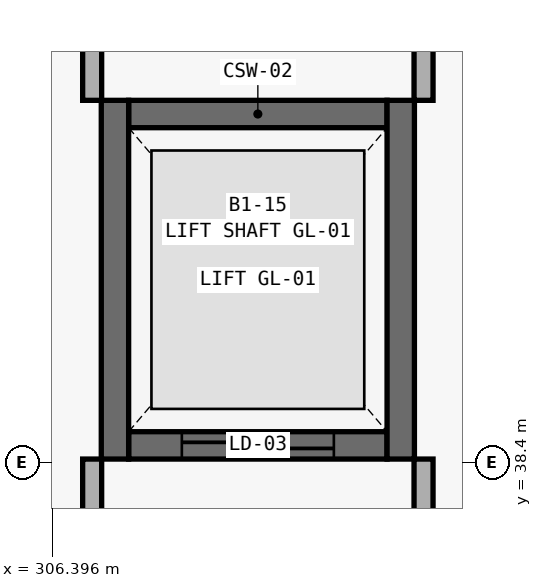
"""IFC4 building model, lengths in metres.
Left out: names, types, materials, properties, quantities, classifications, styles, units other than length and angle.
Written with IfcOpenShell. Run it as: python <this file> out.ifc"""

import sys

from ifc_helpers import new_model, si_unit, direction, frame, frame_2d, origin, place, context, subcontext, project, spatial, rectangle, extrude, element, fill, save


model = new_model("IFC4")
c1 = context("Model", 3, precision=1e-05, world=origin(), true_north=direction((0.0, 1.0)))
c2 = subcontext(c1, "Body", "Model", "MODEL_VIEW")
j1 = project(units=[si_unit("LENGTHUNIT", "METRE"), si_unit("PLANEANGLEUNIT", "RADIAN")], contexts=[c1])
p1 = place(None, origin())
s1 = spatial("IfcSite", under=j1, at=p1, CompositionType="ELEMENT")
p2 = place(p1, origin())
s2 = spatial("IfcBuilding", under=s1, at=p2, CompositionType="ELEMENT")
p3 = place(p2, frame((0.0, 0.0, -4.8)))
s3 = spatial("IfcBuildingStorey", under=s2, at=p3, CompositionType="ELEMENT", Elevation=-4.8)
p4 = place(p3, frame((307.4, 42.98, 0.0), z_axis=(0.0, 0.0, 1.0), x_axis=(1.0, 0.0, 0.0)))
e1 = element("IfcWall", 1, at=p4, inside=s3, PredefinedType="SHEAR", context=c2, shape_type="SweptSolid", body=[
    extrude(rectangle(XDim=3.4, YDim=0.36, at=frame_2d((1.7, 0.0))), origin(), (0.0, 0.0, 1.0), 4.38),
])
p5 = place(p3, frame((307.4, 38.62, 0.0), z_axis=(0.0, 0.0, 1.0), x_axis=(1.0, 0.0, 0.0)))
e2 = element("IfcWall", 2, at=p5, inside=s3, PredefinedType="SHEAR", context=c2, shape_type="SweptSolid", body=[
    extrude(rectangle(XDim=3.4, YDim=0.36, at=frame_2d((1.7, 0.0))), origin(), (0.0, 0.0, 1.0), 4.38),
])
p6 = place(p5, frame((0.7, 0.0, 0.0)))
e3 = element("IfcOpeningElement", 3, at=p6, cuts=e2, PredefinedType="OPENING", context=c2, shape_type="SweptSolid", body=[
    extrude(rectangle(XDim=2.0, YDim=2.4, at=frame_2d((1.0, 1.2))), frame((0.0, 0.195, 0.0), z_axis=(0.0, -1.0, 0.0), x_axis=(1.0, 0.0, 0.0)), (0.0, 0.0, 1.0), 0.39),
])
for number, where, z_axis, x_axis in (
    (4, (307.22, 38.44, 0.0), (0.0, 0.0, 1.0), (0.0, 1.0, 0.0)),
    (5, (310.98, 38.44, 0.0), (0.0, 0.0, 1.0), (0.0, 1.0, 0.0)),
):
    element("IfcWall", number, at=place(p3, frame(where, z_axis=z_axis, x_axis=x_axis)), inside=s3, PredefinedType="SHEAR", context=c2, shape_type="SweptSolid", body=[
        extrude(rectangle(XDim=4.72, YDim=0.36, at=frame_2d((2.36, 0.0))), origin(), (0.0, 0.0, 1.0), 4.38),
    ])
p7 = place(p3, frame((306.92, 36.645, 0.0), z_axis=(0.0, 0.0, 1.0), x_axis=(0.0, 1.0, 0.0)))
e6 = element("IfcWall", 6, at=p7, inside=s3, PredefinedType="PARTITIONING", context=c2, shape_type="SweptSolid", body=[
    extrude(rectangle(XDim=1.795, YDim=0.25, at=frame_2d((0.897, 0.0))), origin(), (0.0, 0.0, 1.0), 3.26),
])
p8 = place(p3, frame((306.92, 43.16, 0.0), z_axis=(0.0, 0.0, 1.0), x_axis=(0.0, 1.0, 0.0)))
e7 = element("IfcWall", 7, at=p8, inside=s3, PredefinedType="PARTITIONING", context=c2, shape_type="SweptSolid", body=[
    extrude(rectangle(XDim=0.795, YDim=0.25, at=frame_2d((0.397, 0.0))), origin(), (0.0, 0.0, 1.0), 3.26),
])
p9 = place(p3, frame((311.28, 36.645, 0.0), z_axis=(0.0, 0.0, 1.0), x_axis=(0.0, 1.0, 0.0)))
e8 = element("IfcWall", 8, at=p9, inside=s3, PredefinedType="PARTITIONING", context=c2, shape_type="SweptSolid", body=[
    extrude(rectangle(XDim=1.795, YDim=0.25, at=frame_2d((0.897, 0.0))), origin(), (0.0, 0.0, 1.0), 3.26),
])
p10 = place(p3, frame((311.28, 43.16, 0.0), z_axis=(0.0, 0.0, 1.0), x_axis=(0.0, 1.0, 0.0)))
e9 = element("IfcWall", 9, at=p10, inside=s3, PredefinedType="PARTITIONING", context=c2, shape_type="SweptSolid", body=[
    extrude(rectangle(XDim=0.795, YDim=0.25, at=frame_2d((0.397, 0.0))), origin(), (0.0, 0.0, 1.0), 3.26),
])
p11 = place(p6, origin())
e10 = element("IfcDoor", 10, at=p11, inside=s3, OperationType="DOUBLE_DOOR_SLIDING", PredefinedType="DOOR", context=c2, shape_type="SweptSolid", body=[
    extrude(rectangle(XDim=2.0, YDim=2.4, at=frame_2d((1.0, 1.2))), frame((0.0, 0.025, 0.0), z_axis=(0.0, -1.0, 0.0), x_axis=(1.0, 0.0, 0.0)), (0.0, 0.0, 1.0), 0.05),
])
fill(e3, e10)
save(model, sys.argv[1])
